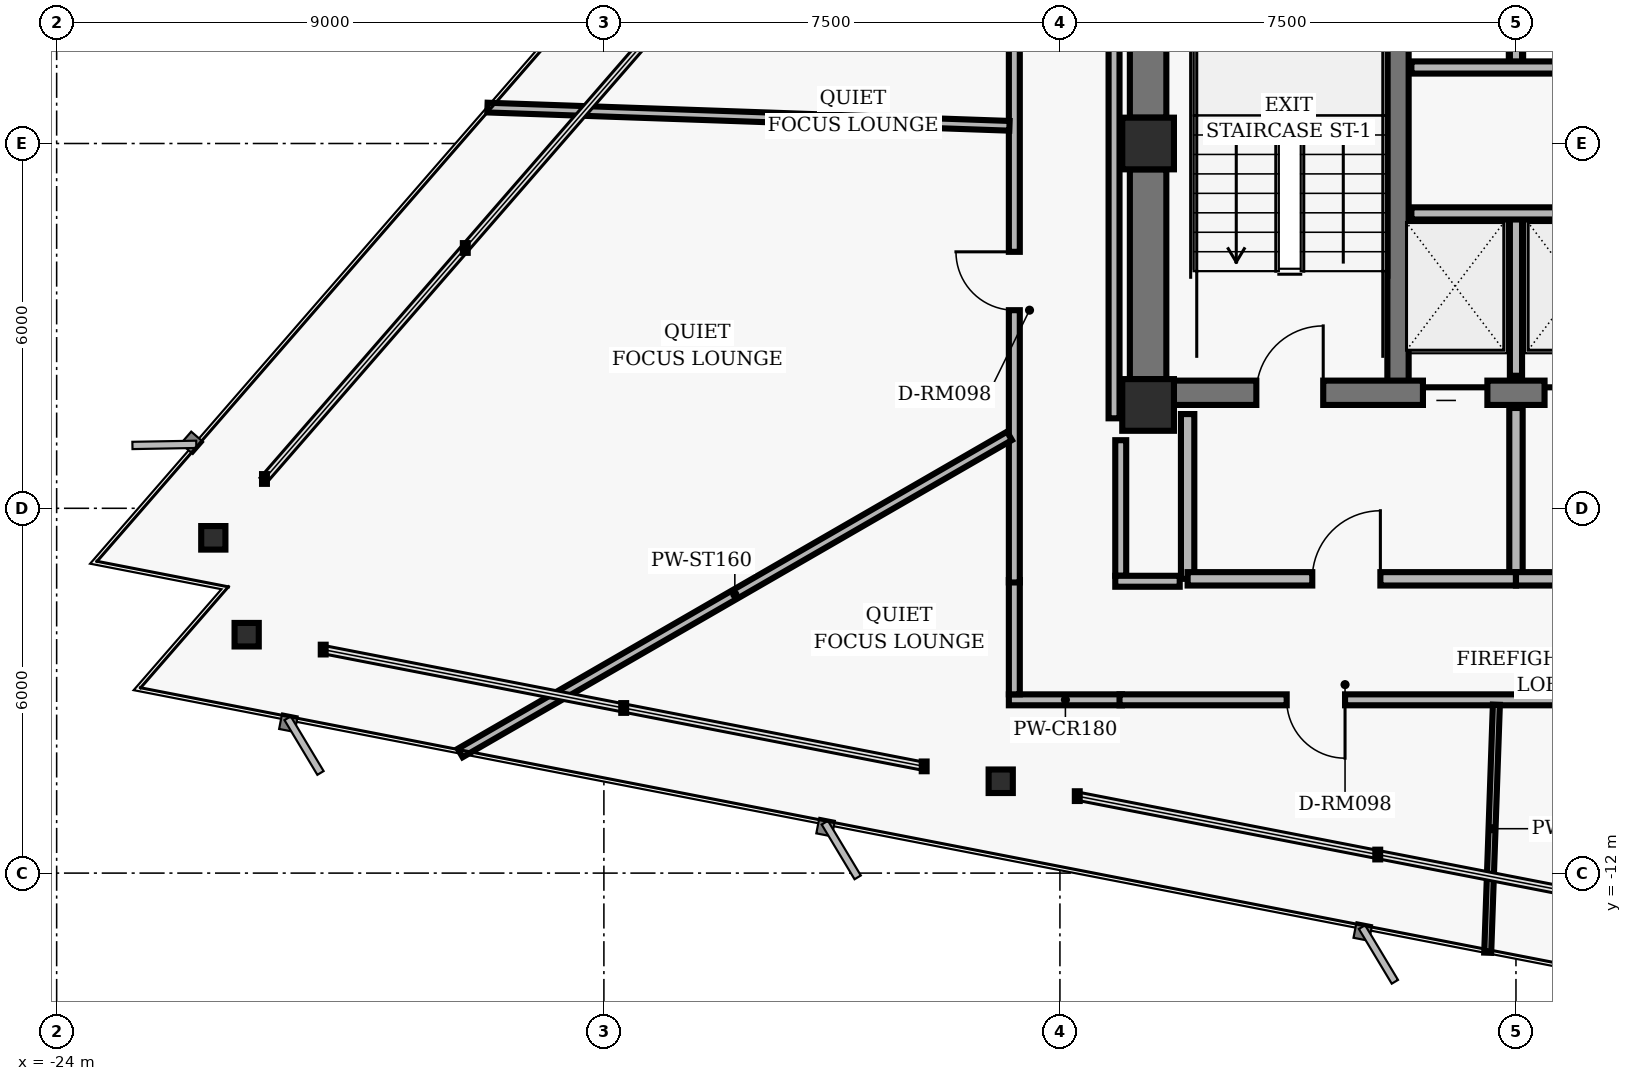
"""IFC4 building model, lengths in metres.
Left out: names, types, materials, properties, quantities, classifications, styles, units other than length and angle.
Written with IfcOpenShell. Run it as: python <this file> out.ifc"""

import sys

from ifc_helpers import new_model, si_unit, direction, frame, frame_2d, origin, origin_2d, place, context, subcontext, project, spatial, rectangle, hollow_rectangle, i_section, extrude, element, fill, save


model = new_model("IFC4")
c1 = context("Model", 3, precision=1e-05, world=origin(), true_north=direction((0.0, 1.0)))
c2 = subcontext(c1, "Body", "Model", "MODEL_VIEW")
j1 = project(units=[si_unit("LENGTHUNIT", "METRE"), si_unit("PLANEANGLEUNIT", "RADIAN")], contexts=[c1])
p1 = place(None, origin())
s1 = spatial("IfcSite", under=j1, at=p1, CompositionType="ELEMENT")
p2 = place(p1, origin())
s2 = spatial("IfcBuilding", under=s1, at=p2, CompositionType="ELEMENT")
p3 = place(p2, frame((0.0, 0.0, 165.44)))
s3 = spatial("IfcBuildingStorey", under=s2, at=p3, CompositionType="ELEMENT", Elevation=165.44)
for number, where, z_axis, x_axis in (
    (1, (-6.05, 0.0, 0.0), (0.0, 0.0, 1.0), (1.0, 0.0, 0.0)),
    (2, (-6.05, -4.3, 0.0), (0.0, 0.0, 1.0), (1.0, 0.0, 0.0)),
):
    element("IfcColumn", number, at=place(p3, frame(where, z_axis=z_axis, x_axis=x_axis)), inside=s3, PredefinedType="COLUMN", context=c2, shape_type="SweptSolid", body=[
        extrude(hollow_rectangle(XDim=0.85, YDim=0.85, WallThickness=0.055, InnerFilletRadius=0.02, OuterFilletRadius=0.04, at=origin_2d()), origin(), (0.0, 0.0, 1.0), 3.04),
    ])
p4 = place(p3, frame((-6.05, 0.425, 0.0), z_axis=(0.0, 0.0, 1.0), x_axis=(0.0, 1.0, 0.0)))
e3 = element("IfcWall", 3, at=p4, inside=s3, PredefinedType="SHEAR", context=c2, shape_type="SweptSolid", body=[
    extrude(rectangle(XDim=3.65, YDim=0.6, at=frame_2d((1.825, 0.0))), origin(), (0.0, 0.0, 1.0), 2.788),
])
p5 = place(p3, frame((-6.05, -3.875, 0.0), z_axis=(0.0, 0.0, 1.0), x_axis=(0.0, 1.0, 0.0)))
e4 = element("IfcWall", 4, at=p5, inside=s3, PredefinedType="SHEAR", context=c2, shape_type="SweptSolid", body=[
    extrude(rectangle(XDim=3.45, YDim=0.6, at=frame_2d((1.725, 0.0))), origin(), (0.0, 0.0, 1.0), 2.788),
])
p6 = place(p3, frame((-1.94, -4.1, 0.0), z_axis=(0.0, 0.0, 1.0), x_axis=(0.0, 1.0, 0.0)))
e5 = element("IfcWall", 5, at=p6, inside=s3, PredefinedType="SHEAR", context=c2, shape_type="SweptSolid", body=[
    extrude(rectangle(XDim=8.2, YDim=0.35, at=frame_2d((4.1, 0.0))), origin(), (0.0, 0.0, 1.0), 2.788),
])
p7 = place(p3, frame((-5.625, -4.1, 0.0), z_axis=(0.0, 0.0, 1.0), x_axis=(1.0, 0.0, 0.0)))
e6 = element("IfcWall", 6, at=p7, inside=s3, PredefinedType="SHEAR", context=c2, shape_type="SweptSolid", body=[
    extrude(rectangle(XDim=11.25, YDim=0.4, at=frame_2d((5.625, 0.0))), origin(), (0.0, 0.0, 1.0), 2.788),
])
p8 = place(p7, frame((1.355, 0.0, 0.0)))
e7 = element("IfcOpeningElement", 7, at=p8, cuts=e6, PredefinedType="OPENING", context=c2, shape_type="SweptSolid", body=[
    extrude(rectangle(XDim=1.1, YDim=2.04, at=frame_2d((0.55, 1.02))), frame((0.0, 0.21, 0.0), z_axis=(0.0, -1.0, 0.0), x_axis=(1.0, 0.0, 0.0)), (0.0, 0.0, 1.0), 0.42),
])
p9 = place(p7, frame((8.795, 0.0, 0.0)))
e8 = element("IfcOpeningElement", 8, at=p9, cuts=e6, PredefinedType="OPENING", context=c2, shape_type="SweptSolid", body=[
    extrude(rectangle(XDim=1.1, YDim=2.04, at=frame_2d((0.55, 1.02))), frame((0.0, 0.21, 0.0), z_axis=(0.0, -1.0, 0.0), x_axis=(1.0, 0.0, 0.0)), (0.0, 0.0, 1.0), 0.42),
])
p10 = place(p7, frame((4.095, 0.0, 0.0)))
e9 = element("IfcOpeningElement", 9, at=p10, cuts=e6, PredefinedType="OPENING", context=c2, shape_type="SweptSolid", body=[
    extrude(rectangle(XDim=1.06, YDim=2.04, at=frame_2d((0.53, 1.02))), frame((0.0, 0.21, 0.0), z_axis=(0.0, -1.0, 0.0), x_axis=(1.0, 0.0, 0.0)), (0.0, 0.0, 1.0), 0.42),
])
p11 = place(p7, frame((6.095, 0.0, 0.0)))
e10 = element("IfcOpeningElement", 10, at=p11, cuts=e6, PredefinedType="OPENING", context=c2, shape_type="SweptSolid", body=[
    extrude(rectangle(XDim=1.06, YDim=2.04, at=frame_2d((0.53, 1.02))), frame((0.0, 0.21, 0.0), z_axis=(0.0, -1.0, 0.0), x_axis=(1.0, 0.0, 0.0)), (0.0, 0.0, 1.0), 0.42),
])
for number, where, z_axis, x_axis in (
    (11, (-21.424, -6.486, 0.0), (0.0, 0.0, 1.0), (1.0, 0.0, 0.0)),
    (12, (-20.875, -8.079, 0.0), (0.0, 0.0, 1.0), (1.0, 0.0, 0.0)),
    (13, (-8.474, -10.49, 0.0), (0.0, 0.0, 1.0), (1.0, 0.0, 0.0)),
):
    element("IfcColumn", number, at=place(p3, frame(where, z_axis=z_axis, x_axis=x_axis)), inside=s3, PredefinedType="COLUMN", context=c2, shape_type="SweptSolid", body=[
        extrude(i_section(OverallWidth=0.398, OverallDepth=0.387, WebThickness=0.021, FlangeThickness=0.033, FilletRadius=0.018, at=origin_2d()), origin(), (0.0, 0.0, 1.0), 3.04),
    ])
p12 = place(p3, frame((0.0, -3.82, 0.0), z_axis=(0.0, 0.0, 1.0), x_axis=(0.0, 1.0, 0.0)))
e14 = element("IfcWall", 14, at=p12, inside=s3, PredefinedType="PARTITIONING", context=c2, shape_type="SweptSolid", body=[
    extrude(rectangle(XDim=2.67, YDim=0.2, at=frame_2d((1.335, 0.0))), origin(), (0.0, 0.0, 1.0), 2.763),
])
p13 = place(p3, frame((-1.72, -1.15, 0.0), z_axis=(0.0, 0.0, 1.0), x_axis=(1.0, 0.0, 0.0)))
e15 = element("IfcWall", 15, at=p13, inside=s3, PredefinedType="PARTITIONING", context=c2, shape_type="SweptSolid", body=[
    extrude(rectangle(XDim=3.44, YDim=0.2, at=frame_2d((1.72, 0.0))), origin(), (0.0, 0.0, 1.0), 2.763),
])
p14 = place(p3, frame((-5.4, -7.16, 0.0), z_axis=(0.0, 0.0, 1.0), x_axis=(0.0, 1.0, 0.0)))
e16 = element("IfcWall", 16, at=p14, inside=s3, PredefinedType="PARTITIONING", context=c2, shape_type="SweptSolid", body=[
    extrude(rectangle(XDim=2.71, YDim=0.22, at=frame_2d((1.355, 0.0))), origin(), (0.0, 0.0, 1.0), 2.763),
])
p15 = place(p3, frame((0.0, -7.16, 0.0), z_axis=(0.0, 0.0, 1.0), x_axis=(0.0, 1.0, 0.0)))
e17 = element("IfcWall", 17, at=p15, inside=s3, PredefinedType="PARTITIONING", context=c2, shape_type="SweptSolid", body=[
    extrude(rectangle(XDim=2.81, YDim=0.22, at=frame_2d((1.405, 0.0))), origin(), (0.0, 0.0, 1.0), 2.763),
])
p16 = place(p3, frame((-5.4, -7.16, 0.0), z_axis=(0.0, 0.0, 1.0), x_axis=(1.0, 0.0, 0.0)))
e18 = element("IfcWall", 18, at=p16, inside=s3, PredefinedType="PARTITIONING", context=c2, shape_type="SweptSolid", body=[
    extrude(rectangle(XDim=5.4, YDim=0.22, at=frame_2d((2.7, 0.0))), origin(), (0.0, 0.0, 1.0), 2.33),
])
p17 = place(p16, frame((2.05, 0.0, 0.0)))
e19 = element("IfcOpeningElement", 19, at=p17, cuts=e18, PredefinedType="OPENING", context=c2, shape_type="SweptSolid", body=[
    extrude(rectangle(XDim=1.12, YDim=2.02, at=frame_2d((0.56, 1.01))), frame((0.0, 0.12, 0.0), z_axis=(0.0, -1.0, 0.0), x_axis=(1.0, 0.0, 0.0)), (0.0, 0.0, 1.0), 0.24),
])
p18 = place(p3, frame((0.0, -7.16, 0.0), z_axis=(0.0, 0.0, 1.0), x_axis=(1.0, 0.0, 0.0)))
e20 = element("IfcWall", 20, at=p18, inside=s3, PredefinedType="PARTITIONING", context=c2, shape_type="SweptSolid", body=[
    extrude(rectangle(XDim=5.4, YDim=0.22, at=frame_2d((2.7, 0.0))), origin(), (0.0, 0.0, 1.0), 2.33),
])
p19 = place(p18, frame((2.05, 0.0, 0.0)))
e21 = element("IfcOpeningElement", 21, at=p19, cuts=e20, PredefinedType="OPENING", context=c2, shape_type="SweptSolid", body=[
    extrude(rectangle(XDim=1.12, YDim=2.02, at=frame_2d((0.56, 1.01))), frame((0.0, 0.12, 0.0), z_axis=(0.0, -1.0, 0.0), x_axis=(1.0, 0.0, 0.0)), (0.0, 0.0, 1.0), 0.24),
])
p20 = place(p3, frame((0.0, 1.25, 0.0), z_axis=(0.0, 0.0, 1.0), x_axis=(0.0, 1.0, 0.0)))
e22 = element("IfcWall", 22, at=p20, inside=s3, PredefinedType="PARTITIONING", context=c2, shape_type="SweptSolid", body=[
    extrude(rectangle(XDim=2.77, YDim=0.2, at=frame_2d((1.385, 0.0))), origin(), (0.0, 0.0, 1.0), 2.763),
])
p21 = place(p3, frame((-1.72, 1.25, 0.0), z_axis=(0.0, 0.0, 1.0), x_axis=(1.0, 0.0, 0.0)))
e23 = element("IfcWall", 23, at=p21, inside=s3, PredefinedType="PARTITIONING", context=c2, shape_type="SweptSolid", body=[
    extrude(rectangle(XDim=3.44, YDim=0.2, at=frame_2d((1.72, 0.0))), origin(), (0.0, 0.0, 1.0), 2.763),
])
p22 = place(p3, frame((-6.48, -9.15, 0.0), z_axis=(0.0, 0.0, 1.0), x_axis=(-1.0, 0.0, 0.0)))
e24 = element("IfcWall", 24, at=p22, inside=s3, PredefinedType="PARTITIONING", context=c2, shape_type="SweptSolid", body=[
    extrude(rectangle(XDim=1.86, YDim=0.18, at=frame_2d((0.93, 0.0))), origin(), (0.0, 0.0, 1.0), 2.33),
])
p23 = place(p3, frame((-8.25, -9.06, 0.0), z_axis=(0.0, 0.0, 1.0), x_axis=(0.0, 1.0, 0.0)))
e25 = element("IfcWall", 25, at=p23, inside=s3, PredefinedType="PARTITIONING", context=c2, shape_type="SweptSolid", body=[
    extrude(rectangle(XDim=1.88, YDim=0.18, at=frame_2d((0.94, 0.0))), origin(), (0.0, 0.0, 1.0), 2.763),
])
p24 = place(p3, frame((-8.25, -7.22, 0.0), z_axis=(0.0, 0.0, 1.0), x_axis=(0.0, 1.0, 0.0)))
e26 = element("IfcWall", 26, at=p24, inside=s3, PredefinedType="PARTITIONING", context=c2, shape_type="SweptSolid", body=[
    extrude(rectangle(XDim=14.44, YDim=0.18, at=frame_2d((7.22, 0.0))), origin(), (0.0, 0.0, 1.0), 2.763),
])
p25 = place(p24, frame((4.478, 0.0, 0.0)))
e27 = element("IfcOpeningElement", 27, at=p25, cuts=e26, PredefinedType="OPENING", context=c2, shape_type="SweptSolid", body=[
    extrude(rectangle(XDim=0.96, YDim=2.02, at=frame_2d((0.48, 1.01))), frame((0.0, 0.1, 0.0), z_axis=(0.0, -1.0, 0.0), x_axis=(1.0, 0.0, 0.0)), (0.0, 0.0, 1.0), 0.2),
])
p26 = place(p24, frame((10.365, 0.0, 0.0)))
e28 = element("IfcOpeningElement", 28, at=p26, cuts=e26, PredefinedType="OPENING", context=c2, shape_type="SweptSolid", body=[
    extrude(rectangle(XDim=0.96, YDim=2.02, at=frame_2d((0.48, 1.01))), frame((0.0, 0.1, 0.0), z_axis=(0.0, -1.0, 0.0), x_axis=(1.0, 0.0, 0.0)), (0.0, 0.0, 1.0), 0.2),
])
p27 = place(p3, frame((-6.61, 4.94, 0.0), z_axis=(0.0, 0.0, 1.0), x_axis=(0.0, -1.0, 0.0)))
e29 = element("IfcWall", 29, at=p27, inside=s3, PredefinedType="PARTITIONING", context=c2, shape_type="SweptSolid", body=[
    extrude(rectangle(XDim=9.46, YDim=0.18, at=frame_2d((4.73, 0.0))), origin(), (0.0, 0.0, 1.0), 2.763),
])
p28 = place(p3, frame((-6.5, -4.88, 0.0), z_axis=(0.0, 0.0, 1.0), x_axis=(0.0, -1.0, 0.0)))
e30 = element("IfcWall", 30, at=p28, inside=s3, PredefinedType="PARTITIONING", context=c2, shape_type="SweptSolid", body=[
    extrude(rectangle(XDim=2.23, YDim=0.18, at=frame_2d((1.115, 0.0))), origin(), (0.0, 0.0, 1.0), 2.763),
])
p29 = place(p3, frame((-6.59, -7.2, 0.0), z_axis=(0.0, 0.0, 1.0), x_axis=(1.0, 0.0, 0.0)))
e31 = element("IfcWall", 31, at=p29, inside=s3, PredefinedType="PARTITIONING", context=c2, shape_type="SweptSolid", body=[
    extrude(rectangle(XDim=1.06, YDim=0.18, at=frame_2d((0.53, 0.0))), origin(), (0.0, 0.0, 1.0), 2.763),
])
p30 = place(p3, frame((10.98, -9.15, 0.0), z_axis=(0.0, 0.0, 1.0), x_axis=(-1.0, 0.0, 0.0)))
e32 = element("IfcWall", 32, at=p30, inside=s3, PredefinedType="PARTITIONING", context=c2, shape_type="SweptSolid", body=[
    extrude(rectangle(XDim=17.5, YDim=0.18, at=frame_2d((8.75, 0.0))), origin(), (0.0, 0.0, 1.0), 2.33),
])
p31 = place(p30, frame((13.791, 0.0, 0.0)))
e33 = element("IfcOpeningElement", 33, at=p31, cuts=e32, PredefinedType="OPENING", context=c2, shape_type="SweptSolid", body=[
    extrude(rectangle(XDim=0.96, YDim=2.02, at=frame_2d((0.48, 1.01))), frame((0.0, 0.1, 0.0), z_axis=(0.0, -1.0, 0.0), x_axis=(1.0, 0.0, 0.0)), (0.0, 0.0, 1.0), 0.2),
])
p32 = place(p30, frame((5.302, 0.0, 0.0)))
e34 = element("IfcOpeningElement", 34, at=p32, cuts=e32, PredefinedType="OPENING", context=c2, shape_type="SweptSolid", body=[
    extrude(rectangle(XDim=0.96, YDim=2.02, at=frame_2d((0.48, 1.01))), frame((0.0, 0.1, 0.0), z_axis=(0.0, -1.0, 0.0), x_axis=(1.0, 0.0, 0.0)), (0.0, 0.0, 1.0), 0.2),
])
p33 = place(p3, frame((-8.33, -4.809, 0.0), z_axis=(0.0, 0.0, 1.0), x_axis=(-0.866024997974, -0.500000702884, 0.0)))
e35 = element("IfcWall", 35, at=p33, inside=s3, PredefinedType="PARTITIONING", context=c2, shape_type="SweptSolid", body=[
    extrude(rectangle(XDim=10.431, YDim=0.16, at=frame_2d((5.215, 0.0))), origin(), (0.0, 0.0, 1.0), 2.132),
])
p34 = place(p3, frame((-0.322, -9.23, 0.0), z_axis=(0.0, 0.0, 1.0), x_axis=(-0.034927807623, -0.999389837978, 0.0)))
e36 = element("IfcWall", 36, at=p34, inside=s3, PredefinedType="MOVABLE", context=c2, shape_type="SweptSolid", body=[
    extrude(rectangle(XDim=4.082, YDim=0.115, at=frame_2d((2.041, 0.0))), origin(), (0.0, 0.0, 1.0), 2.763),
])
p35 = place(p3, frame((-8.33, 0.291, 0.0), z_axis=(0.0, 0.0, 1.0), x_axis=(-0.999390815976, 0.03489981294, 0.0)))
e37 = element("IfcWall", 37, at=p35, inside=s3, PredefinedType="PARTITIONING", context=c2, shape_type="SweptSolid", body=[
    extrude(rectangle(XDim=8.59, YDim=0.16, at=frame_2d((4.295, 0.0))), origin(), (0.0, 0.0, 1.0), 2.763),
])
p36 = place(p8, origin())
e38 = element("IfcDoor", 38, at=p36, inside=s3, OperationType="SINGLE_SWING_RIGHT", PredefinedType="DOOR", context=c2, shape_type="SweptSolid", body=[
    extrude(rectangle(XDim=1.1, YDim=2.04, at=frame_2d((0.55, 1.02))), frame((0.0, 0.025, 0.0), z_axis=(0.0, -1.0, 0.0), x_axis=(1.0, 0.0, 0.0)), (0.0, 0.0, 1.0), 0.05),
])
fill(e7, e38)
p37 = place(p10, origin())
e39 = element("IfcDoor", 39, at=p37, inside=s3, OperationType="SLIDING_TO_LEFT", PredefinedType="DOOR", context=c2, shape_type="SweptSolid", body=[
    extrude(rectangle(XDim=1.06, YDim=2.04, at=frame_2d((0.53, 1.02))), frame((0.0, 0.025, 0.0), z_axis=(0.0, -1.0, 0.0), x_axis=(1.0, 0.0, 0.0)), (0.0, 0.0, 1.0), 0.05),
])
fill(e9, e39)
p38 = place(p11, origin())
e40 = element("IfcDoor", 40, at=p38, inside=s3, OperationType="SLIDING_TO_RIGHT", PredefinedType="DOOR", context=c2, shape_type="SweptSolid", body=[
    extrude(rectangle(XDim=1.06, YDim=2.04, at=frame_2d((0.53, 1.02))), frame((0.0, 0.025, 0.0), z_axis=(0.0, -1.0, 0.0), x_axis=(1.0, 0.0, 0.0)), (0.0, 0.0, 1.0), 0.05),
])
fill(e10, e40)
p39 = place(p17, origin())
e41 = element("IfcDoor", 41, at=p39, inside=s3, OperationType="SINGLE_SWING_RIGHT", PredefinedType="DOOR", context=c2, shape_type="SweptSolid", body=[
    extrude(rectangle(XDim=1.12, YDim=2.02, at=frame_2d((0.56, 1.01))), frame((0.0, 0.025, 0.0), z_axis=(0.0, -1.0, 0.0), x_axis=(1.0, 0.0, 0.0)), (0.0, 0.0, 1.0), 0.05),
])
fill(e19, e41)
p40 = place(p25, origin())
e42 = element("IfcDoor", 42, at=p40, inside=s3, OperationType="SINGLE_SWING_RIGHT", PredefinedType="DOOR", context=c2, shape_type="SweptSolid", body=[
    extrude(rectangle(XDim=0.96, YDim=2.02, at=frame_2d((0.48, 1.01))), frame((0.0, 0.025, 0.0), z_axis=(0.0, -1.0, 0.0), x_axis=(1.0, 0.0, 0.0)), (0.0, 0.0, 1.0), 0.05),
])
fill(e27, e42)
p41 = place(p31, origin())
e43 = element("IfcDoor", 43, at=p41, inside=s3, OperationType="SINGLE_SWING_LEFT", PredefinedType="DOOR", context=c2, shape_type="SweptSolid", body=[
    extrude(rectangle(XDim=0.96, YDim=2.02, at=frame_2d((0.48, 1.01))), frame((0.0, 0.025, 0.0), z_axis=(0.0, -1.0, 0.0), x_axis=(1.0, 0.0, 0.0)), (0.0, 0.0, 1.0), 0.05),
])
fill(e33, e43)
save(model, sys.argv[1])
